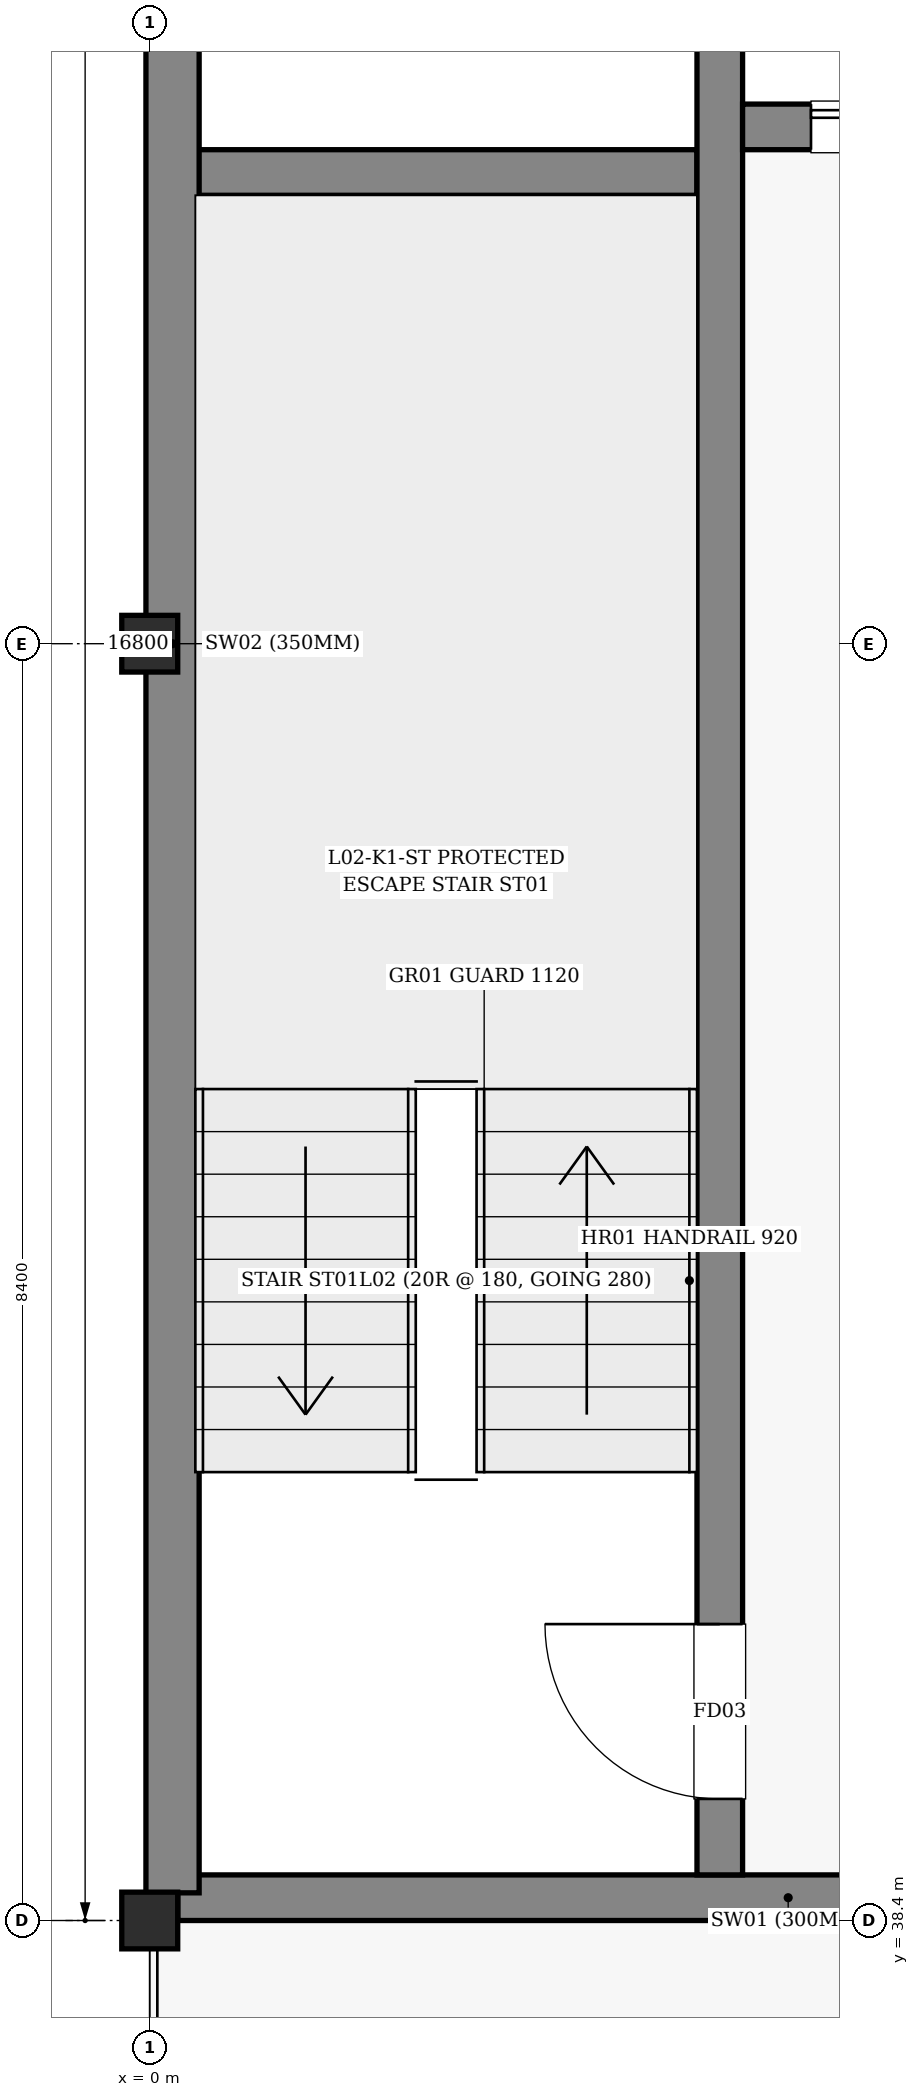
"""IFC4 building model, lengths in metres.
Left out: names, types, materials, properties, quantities, classifications, styles, units other than length and angle.
Written with IfcOpenShell. Run it as: python <this file> out.ifc"""

import sys

from ifc_helpers import new_model, si_unit, direction, frame, frame_2d, origin, origin_2d, place, context, subcontext, project, spatial, rectangle, i_section, extrude, element, fill, save


model = new_model("IFC4")
c1 = context("Model", 3, precision=1e-05, world=origin(), true_north=direction((0.0, 1.0)))
c2 = subcontext(c1, "Body", "Model", "MODEL_VIEW")
j1 = project(units=[si_unit("LENGTHUNIT", "METRE"), si_unit("PLANEANGLEUNIT", "RADIAN")], contexts=[c1])
p1 = place(None, origin())
s1 = spatial("IfcSite", under=j1, at=p1, CompositionType="ELEMENT")
p2 = place(p1, origin())
s2 = spatial("IfcBuilding", under=s1, at=p2, CompositionType="ELEMENT")
p3 = place(p2, frame((0.0, 0.0, 9.0)))
s3 = spatial("IfcBuildingStorey", under=s2, at=p3, CompositionType="ELEMENT", Elevation=9.0)
for number, where, z_axis, x_axis in (
    (1, (0.0, 38.4, 0.0), (0.0, 0.0, 1.0), (1.0, 0.0, 0.0)),
    (2, (0.0, 46.8, 0.0), (0.0, 0.0, 1.0), (1.0, 0.0, 0.0)),
):
    element("IfcColumn", number, at=place(p3, frame(where, z_axis=z_axis, x_axis=x_axis)), inside=s3, PredefinedType="COLUMN", context=c2, shape_type="SweptSolid", body=[
        extrude(i_section(OverallWidth=0.373, OverallDepth=0.368, WebThickness=0.014, FlangeThickness=0.024, FilletRadius=0.015, at=origin_2d()), origin(), (0.0, 0.0, 1.0), 3.6),
    ])
p4 = place(p3, frame((0.185, 38.55, 0.0), z_axis=(0.0, 0.0, 1.0), x_axis=(1.0, 0.0, 0.0)))
e3 = element("IfcWall", 3, at=p4, inside=s3, PredefinedType="SHEAR", context=c2, shape_type="SweptSolid", body=[
    extrude(rectangle(XDim=8.031, YDim=0.3, at=frame_2d((4.016, 0.0))), origin(), (0.0, 0.0, 1.0), 3.38),
])
p5 = place(p3, frame((0.3, 49.9, 0.0), z_axis=(0.0, 0.0, 1.0), x_axis=(1.0, 0.0, 0.0)))
e4 = element("IfcWall", 4, at=p5, inside=s3, PredefinedType="SHEAR", context=c2, shape_type="SweptSolid", body=[
    extrude(rectangle(XDim=3.3, YDim=0.3, at=frame_2d((1.65, 0.0))), origin(), (0.0, 0.0, 1.0), 3.38),
])
p6 = place(p3, frame((0.15, 38.582, 0.0), z_axis=(0.0, 0.0, 1.0), x_axis=(0.0, 1.0, 0.0)))
e5 = element("IfcWall", 5, at=p6, inside=s3, PredefinedType="SHEAR", context=c2, shape_type="SweptSolid", body=[
    extrude(rectangle(XDim=16.436, YDim=0.35, at=frame_2d((8.218, 0.0))), origin(), (0.0, 0.0, 1.0), 3.38),
])
p7 = place(p3, frame((3.75, 38.7, 0.0), z_axis=(0.0, 0.0, 1.0), x_axis=(0.0, 1.0, 0.0)))
e6 = element("IfcWall", 6, at=p7, inside=s3, PredefinedType="SHEAR", context=c2, shape_type="SweptSolid", body=[
    extrude(rectangle(XDim=16.2, YDim=0.3, at=frame_2d((8.1, 0.0))), origin(), (0.0, 0.0, 1.0), 3.38),
])
p8 = place(p7, frame((0.5, 0.0, 0.0)))
e7 = element("IfcOpeningElement", 7, at=p8, cuts=e6, PredefinedType="OPENING", context=c2, shape_type="SweptSolid", body=[
    extrude(rectangle(XDim=1.15, YDim=2.15, at=frame_2d((0.575, 1.075))), frame((0.0, 0.16, 0.0), z_axis=(0.0, -1.0, 0.0), x_axis=(1.0, 0.0, 0.0)), (0.0, 0.0, 1.0), 0.32),
])
p9 = place(p3, frame((3.9, 50.2, 0.0), z_axis=(0.0, 0.0, 1.0), x_axis=(1.0, 0.0, 0.0)))
e8 = element("IfcWall", 8, at=p9, inside=s3, PredefinedType="SHEAR", context=c2, shape_type="SweptSolid", body=[
    extrude(rectangle(XDim=4.2, YDim=0.3, at=frame_2d((2.1, 0.0))), origin(), (0.0, 0.0, 1.0), 3.38),
])
p10 = place(p9, frame((0.45, 0.0, 0.0)))
e9 = element("IfcOpeningElement", 9, at=p10, cuts=e8, PredefinedType="OPENING", context=c2, shape_type="SweptSolid", body=[
    extrude(rectangle(XDim=1.1, YDim=2.2, at=frame_2d((0.55, 1.1))), frame((0.0, 0.16, 0.0), z_axis=(0.0, -1.0, 0.0), x_axis=(1.0, 0.0, 0.0)), (0.0, 0.0, 1.0), 0.32),
])
p11 = place(p9, frame((2.65, 0.0, 0.0)))
e10 = element("IfcOpeningElement", 10, at=p11, cuts=e8, PredefinedType="OPENING", context=c2, shape_type="SweptSolid", body=[
    extrude(rectangle(XDim=1.1, YDim=2.2, at=frame_2d((0.55, 1.1))), frame((0.0, 0.16, 0.0), z_axis=(0.0, -1.0, 0.0), x_axis=(1.0, 0.0, 0.0)), (0.0, 0.0, 1.0), 0.32),
])
p12 = place(p8, frame((1.15, 0.0, 0.0), z_axis=(0.0, 0.0, 1.0), x_axis=(-1.0, 0.0, 0.0)))
e11 = element("IfcDoor", 11, at=p12, inside=s3, OperationType="SINGLE_SWING_LEFT", PredefinedType="DOOR", context=c2, shape_type="SweptSolid", body=[
    extrude(rectangle(XDim=1.15, YDim=2.15, at=frame_2d((0.575, 1.075))), frame((0.0, 0.025, 0.0), z_axis=(0.0, -1.0, 0.0), x_axis=(1.0, 0.0, 0.0)), (0.0, 0.0, 1.0), 0.05),
])
fill(e7, e11)
p13 = place(p10, origin())
e12 = element("IfcDoor", 12, at=p13, inside=s3, OperationType="SLIDING_TO_LEFT", PredefinedType="DOOR", context=c2, shape_type="SweptSolid", body=[
    extrude(rectangle(XDim=1.1, YDim=2.2, at=frame_2d((0.55, 1.1))), frame((0.0, 0.025, 0.0), z_axis=(0.0, -1.0, 0.0), x_axis=(1.0, 0.0, 0.0)), (0.0, 0.0, 1.0), 0.05),
])
fill(e9, e12)
save(model, sys.argv[1])
